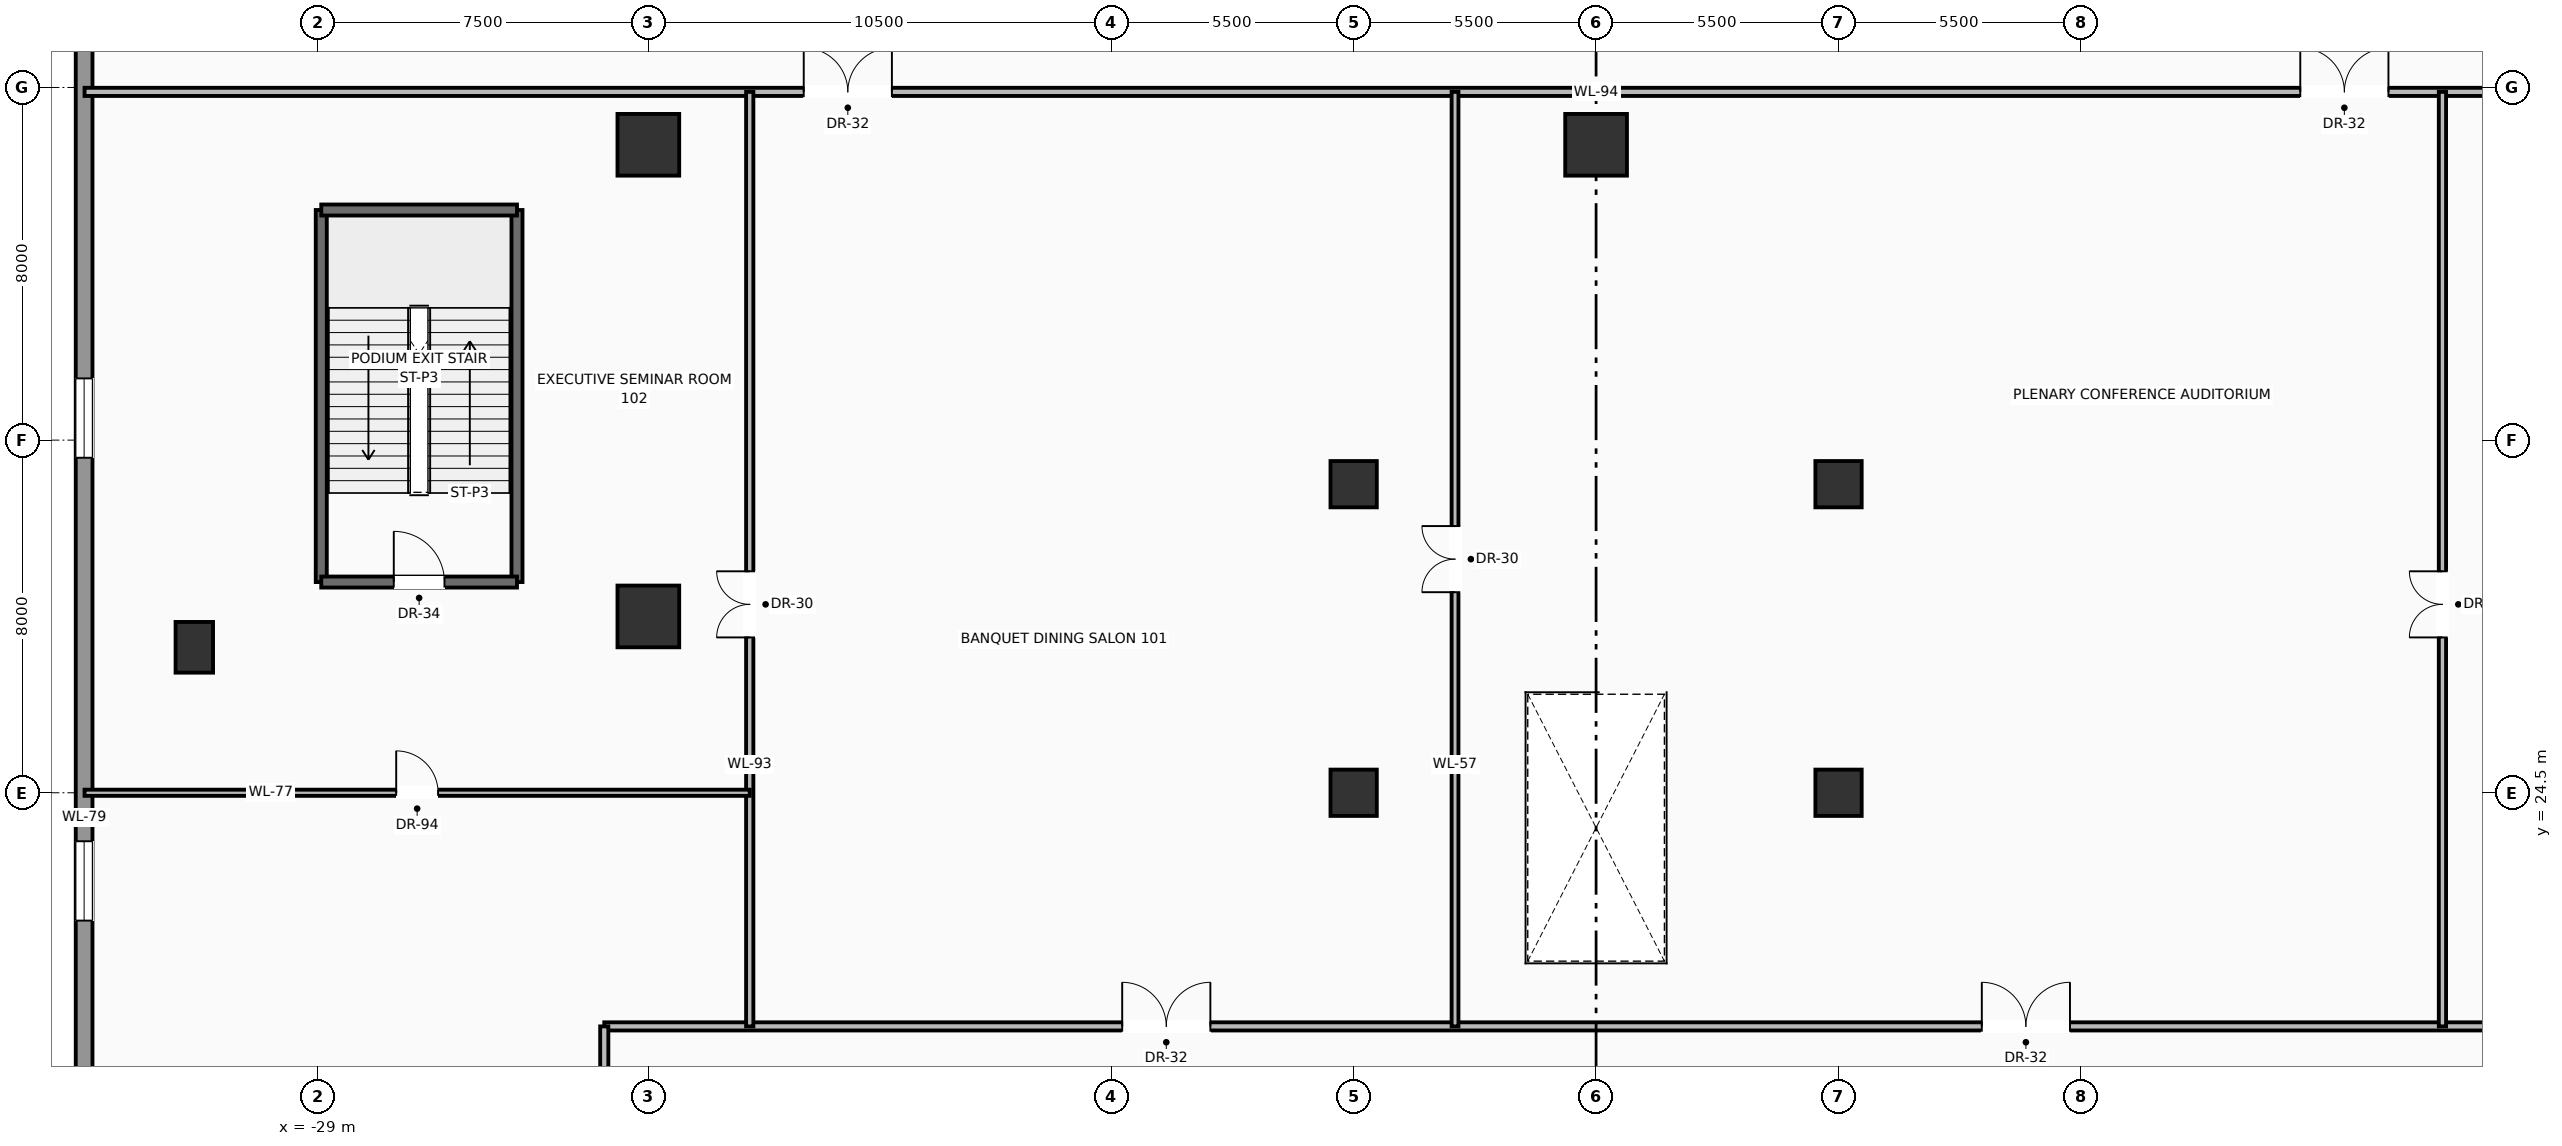
"""IFC4 building model, lengths in metres.
Left out: names, types, materials, properties, quantities, classifications, styles, units other than length and angle.
Written with IfcOpenShell. Run it as: python <this file> out.ifc"""

import sys

from ifc_helpers import new_model, si_unit, direction, frame, frame_2d, origin, origin_2d, place, context, subcontext, project, spatial, rectangle, hollow_rectangle, extrude, source, transform, mapped, element, fill, save


model = new_model("IFC4")
c1 = context("Model", 3, precision=1e-05, world=origin(), true_north=direction((0.0, 1.0)))
c2 = subcontext(c1, "Body", "Model", "MODEL_VIEW")
j1 = project(units=[si_unit("LENGTHUNIT", "METRE"), si_unit("PLANEANGLEUNIT", "RADIAN")], contexts=[c1])
p1 = place(None, origin())
s1 = spatial("IfcSite", under=j1, at=p1, CompositionType="ELEMENT")
p2 = place(p1, origin())
s2 = spatial("IfcBuilding", under=s1, at=p2, CompositionType="ELEMENT")
p3 = place(p2, frame((0.0, 0.0, 5.5)))
s3 = spatial("IfcBuildingStorey", under=s2, at=p3, CompositionType="ELEMENT", Elevation=5.5)
m1 = source(origin(), c2, "Body", "SweptSolid", [
    extrude(rectangle(XDim=1.05, YDim=1.05, at=origin_2d()), origin(), (0.0, 0.0, 1.0), 5.5),
])
for number, where, z_axis, x_axis in (
    (1, (-5.5, 24.5, 0.0), (0.0, 0.0, 1.0), (1.0, 0.0, 0.0)),
    (2, (5.5, 24.5, 0.0), (0.0, 0.0, 1.0), (1.0, 0.0, 0.0)),
    (3, (-5.5, 31.5, 0.0), (0.0, 0.0, 1.0), (1.0, 0.0, 0.0)),
    (4, (5.5, 31.5, 0.0), (0.0, 0.0, 1.0), (1.0, 0.0, 0.0)),
):
    element("IfcColumn", number, at=place(p3, frame(where, z_axis=z_axis, x_axis=x_axis)), inside=s3, PredefinedType="COLUMN", context=c2, shape_type="MappedRepresentation", body=[
        mapped(m1, transform((0.0, 0.0, 0.0), scale=1.0)),
    ])
m2 = source(origin(), c2, "Body", "SweptSolid", [
    extrude(hollow_rectangle(XDim=1.4, YDim=1.4, WallThickness=0.07, at=origin_2d()), origin(), (0.0, 0.0, 1.0), 5.5),
])
for number, where, z_axis, x_axis in (
    (5, (-21.5, 28.5, 0.0), (0.0, 0.0, 1.0), (1.0, 0.0, 0.0)),
    (6, (-21.5, 39.2, 0.0), (0.0, 0.0, 1.0), (1.0, 0.0, 0.0)),
    (7, (0.0, 39.2, 0.0), (0.0, 0.0, 1.0), (1.0, 0.0, 0.0)),
):
    element("IfcColumn", number, at=place(p3, frame(where, z_axis=z_axis, x_axis=x_axis)), inside=s3, PredefinedType="COLUMN", context=c2, shape_type="MappedRepresentation", body=[
        mapped(m2, transform((0.0, 0.0, 0.0), scale=1.0)),
    ])
m3 = source(origin(), c2, "Body", "SweptSolid", [
    extrude(rectangle(XDim=0.85, YDim=1.15, at=origin_2d()), origin(), (0.0, 0.0, 1.0), 5.5),
])
p4 = place(p3, frame((-31.8, 27.8, 0.0), z_axis=(0.0, 0.0, 1.0), x_axis=(1.0, 0.0, 0.0)))
e8 = element("IfcColumn", 8, at=p4, inside=s3, PredefinedType="COLUMN", context=c2, shape_type="MappedRepresentation", body=[
    mapped(m3, transform((0.0, 0.0, 0.0), scale=1.0)),
])
p5 = place(p3, frame((-34.3, 4.35, 0.0), z_axis=(0.0, 0.0, 1.0), x_axis=(0.0, 1.0, 0.0)))
e9 = element("IfcWall", 9, at=p5, inside=s3, PredefinedType="SOLIDWALL", context=c2, shape_type="SweptSolid", body=[
    extrude(rectangle(XDim=39.2, YDim=0.38, at=frame_2d((19.6, 0.0))), origin(), (0.0, 0.0, 1.0), 4.11),
])
p6 = place(p5, frame((6.75, 0.0, 0.95)))
e10 = element("IfcOpeningElement", 10, at=p6, cuts=e9, PredefinedType="OPENING", context=c2, shape_type="SweptSolid", body=[
    extrude(rectangle(XDim=1.8, YDim=2.4, at=frame_2d((0.9, 1.2))), frame((0.0, 0.2, 0.0), z_axis=(0.0, -1.0, 0.0), x_axis=(1.0, 0.0, 0.0)), (0.0, 0.0, 1.0), 0.4),
])
p7 = place(p5, frame((17.25, 0.0, 0.95)))
e11 = element("IfcOpeningElement", 11, at=p7, cuts=e9, PredefinedType="OPENING", context=c2, shape_type="SweptSolid", body=[
    extrude(rectangle(XDim=1.8, YDim=2.4, at=frame_2d((0.9, 1.2))), frame((0.0, 0.2, 0.0), z_axis=(0.0, -1.0, 0.0), x_axis=(1.0, 0.0, 0.0)), (0.0, 0.0, 1.0), 0.4),
])
p8 = place(p5, frame((27.75, 0.0, 0.95)))
e12 = element("IfcOpeningElement", 12, at=p8, cuts=e9, PredefinedType="OPENING", context=c2, shape_type="SweptSolid", body=[
    extrude(rectangle(XDim=1.8, YDim=2.4, at=frame_2d((0.9, 1.2))), frame((0.0, 0.2, 0.0), z_axis=(0.0, -1.0, 0.0), x_axis=(1.0, 0.0, 0.0)), (0.0, 0.0, 1.0), 0.4),
])
for number, where, z_axis, x_axis in (
    (13, (-28.92, 29.28, 0.0), (0.0, 0.0, 1.0), (0.0, 1.0, 0.0)),
    (14, (-24.48, 29.28, 0.0), (0.0, 0.0, 1.0), (0.0, 1.0, 0.0)),
):
    element("IfcWall", number, at=place(p3, frame(where, z_axis=z_axis, x_axis=x_axis)), inside=s3, PredefinedType="SOLIDWALL", context=c2, shape_type="SweptSolid", body=[
        extrude(rectangle(XDim=8.44, YDim=0.25, at=frame_2d((4.22, 0.0))), origin(), (0.0, 0.0, 1.0), 5.17),
    ])
p9 = place(p3, frame((-28.92, 29.28, 0.0), z_axis=(0.0, 0.0, 1.0), x_axis=(1.0, 0.0, 0.0)))
e15 = element("IfcWall", 15, at=p9, inside=s3, PredefinedType="SOLIDWALL", context=c2, shape_type="SweptSolid", body=[
    extrude(rectangle(XDim=4.44, YDim=0.25, at=frame_2d((2.22, 0.0))), origin(), (0.0, 0.0, 1.0), 5.17),
])
p10 = place(p9, frame((1.645, 0.0, 0.0)))
e16 = element("IfcOpeningElement", 16, at=p10, cuts=e15, PredefinedType="OPENING", context=c2, shape_type="SweptSolid", body=[
    extrude(rectangle(XDim=1.15, YDim=2.2, at=frame_2d((0.575, 1.1))), frame((0.0, 0.135, 0.0), z_axis=(0.0, -1.0, 0.0), x_axis=(1.0, 0.0, 0.0)), (0.0, 0.0, 1.0), 0.27),
])
p11 = place(p3, frame((-24.48, 37.72, 0.0), z_axis=(0.0, 0.0, 1.0), x_axis=(-1.0, 0.0, 0.0)))
e17 = element("IfcWall", 17, at=p11, inside=s3, PredefinedType="SOLIDWALL", context=c2, shape_type="SweptSolid", body=[
    extrude(rectangle(XDim=4.44, YDim=0.25, at=frame_2d((2.22, 0.0))), origin(), (0.0, 0.0, 1.0), 5.17),
])
p12 = place(p3, frame((-34.29, 40.4, 0.0), z_axis=(0.0, 0.0, 1.0), x_axis=(1.0, 0.0, 0.0)))
e18 = element("IfcWall", 18, at=p12, inside=s3, PredefinedType="PARTITIONING", context=c2, shape_type="SweptSolid", body=[
    extrude(rectangle(XDim=68.58, YDim=0.185, at=frame_2d((34.29, 0.0))), origin(), (0.0, 0.0, 1.0), 4.122),
])
p13 = place(p12, frame((16.315, 0.0, 0.0)))
e19 = element("IfcOpeningElement", 19, at=p13, cuts=e18, PredefinedType="OPENING", context=c2, shape_type="SweptSolid", body=[
    extrude(rectangle(XDim=2.0, YDim=2.4, at=frame_2d((1.0, 1.2))), frame((0.0, 0.103, 0.0), z_axis=(0.0, -1.0, 0.0), x_axis=(1.0, 0.0, 0.0)), (0.0, 0.0, 1.0), 0.205),
])
p14 = place(p12, frame((50.265, 0.0, 0.0)))
e20 = element("IfcOpeningElement", 20, at=p14, cuts=e18, PredefinedType="OPENING", context=c2, shape_type="SweptSolid", body=[
    extrude(rectangle(XDim=2.0, YDim=2.4, at=frame_2d((1.0, 1.2))), frame((0.0, 0.103, 0.0), z_axis=(0.0, -1.0, 0.0), x_axis=(1.0, 0.0, 0.0)), (0.0, 0.0, 1.0), 0.205),
])
p15 = place(p3, frame((-22.5, 19.2, 0.0), z_axis=(0.0, 0.0, 1.0), x_axis=(1.0, 0.0, 0.0)))
e21 = element("IfcWall", 21, at=p15, inside=s3, PredefinedType="PARTITIONING", context=c2, shape_type="SweptSolid", body=[
    extrude(rectangle(XDim=45.0, YDim=0.185, at=frame_2d((22.5, 0.0))), origin(), (0.0, 0.0, 1.0), 4.122),
])
p16 = place(p15, frame((11.75, 0.0, 0.0)))
e22 = element("IfcOpeningElement", 22, at=p16, cuts=e21, PredefinedType="OPENING", context=c2, shape_type="SweptSolid", body=[
    extrude(rectangle(XDim=2.0, YDim=2.4, at=frame_2d((1.0, 1.2))), frame((0.0, 0.103, 0.0), z_axis=(0.0, -1.0, 0.0), x_axis=(1.0, 0.0, 0.0)), (0.0, 0.0, 1.0), 0.205),
])
p17 = place(p15, frame((31.25, 0.0, 0.0)))
e23 = element("IfcOpeningElement", 23, at=p17, cuts=e21, PredefinedType="OPENING", context=c2, shape_type="SweptSolid", body=[
    extrude(rectangle(XDim=2.0, YDim=2.4, at=frame_2d((1.0, 1.2))), frame((0.0, 0.103, 0.0), z_axis=(0.0, -1.0, 0.0), x_axis=(1.0, 0.0, 0.0)), (0.0, 0.0, 1.0), 0.205),
])
p18 = place(p3, frame((-22.5, 16.55, 0.0), z_axis=(0.0, 0.0, 1.0), x_axis=(0.0, 1.0, 0.0)))
e24 = element("IfcWall", 24, at=p18, inside=s3, PredefinedType="PARTITIONING", context=c2, shape_type="SweptSolid", body=[
    extrude(rectangle(XDim=2.65, YDim=0.185, at=frame_2d((1.325, 0.0))), origin(), (0.0, 0.0, 1.0), 5.162),
])
p19 = place(p3, frame((-19.2, 19.2, 0.0), z_axis=(0.0, 0.0, 1.0), x_axis=(0.0, 1.0, 0.0)))
e25 = element("IfcWall", 25, at=p19, inside=s3, PredefinedType="PARTITIONING", context=c2, shape_type="SweptSolid", body=[
    extrude(rectangle(XDim=21.2, YDim=0.165, at=frame_2d((10.6, 0.0))), origin(), (0.0, 0.0, 1.0), 4.122),
])
p20 = place(p19, frame((8.824, 0.0, 0.0)))
e26 = element("IfcOpeningElement", 26, at=p20, cuts=e25, PredefinedType="OPENING", context=c2, shape_type="SweptSolid", body=[
    extrude(rectangle(XDim=1.5, YDim=2.25, at=frame_2d((0.75, 1.125))), frame((0.0, 0.093, 0.0), z_axis=(0.0, -1.0, 0.0), x_axis=(1.0, 0.0, 0.0)), (0.0, 0.0, 1.0), 0.185),
])
p21 = place(p3, frame((19.2, 19.2, 0.0), z_axis=(0.0, 0.0, 1.0), x_axis=(0.0, 1.0, 0.0)))
e27 = element("IfcWall", 27, at=p21, inside=s3, PredefinedType="PARTITIONING", context=c2, shape_type="SweptSolid", body=[
    extrude(rectangle(XDim=21.2, YDim=0.165, at=frame_2d((10.6, 0.0))), origin(), (0.0, 0.0, 1.0), 4.122),
])
p22 = place(p21, frame((8.824, 0.0, 0.0)))
e28 = element("IfcOpeningElement", 28, at=p22, cuts=e27, PredefinedType="OPENING", context=c2, shape_type="SweptSolid", body=[
    extrude(rectangle(XDim=1.5, YDim=2.25, at=frame_2d((0.75, 1.125))), frame((0.0, 0.093, 0.0), z_axis=(0.0, -1.0, 0.0), x_axis=(1.0, 0.0, 0.0)), (0.0, 0.0, 1.0), 0.185),
])
p23 = place(p3, frame((-3.2, 19.2, 0.0), z_axis=(0.0, 0.0, 1.0), x_axis=(0.0, 1.0, 0.0)))
e29 = element("IfcWall", 29, at=p23, inside=s3, PredefinedType="MOVABLE", context=c2, shape_type="SweptSolid", body=[
    extrude(rectangle(XDim=21.2, YDim=0.155, at=frame_2d((10.6, 0.0))), origin(), (0.0, 0.0, 1.0), 4.122),
])
p24 = place(p23, frame((9.85, 0.0, 0.0)))
e30 = element("IfcOpeningElement", 30, at=p24, cuts=e29, PredefinedType="OPENING", context=c2, shape_type="SweptSolid", body=[
    extrude(rectangle(XDim=1.5, YDim=2.25, at=frame_2d((0.75, 1.125))), frame((0.0, 0.087, 0.0), z_axis=(0.0, -1.0, 0.0), x_axis=(1.0, 0.0, 0.0)), (0.0, 0.0, 1.0), 0.175),
])
p25 = place(p3, frame((-34.29, 24.5, 0.0), z_axis=(0.0, 0.0, 1.0), x_axis=(1.0, 0.0, 0.0)))
e31 = element("IfcWall", 31, at=p25, inside=s3, PredefinedType="PARTITIONING", context=c2, shape_type="SweptSolid", body=[
    extrude(rectangle(XDim=15.09, YDim=0.14, at=frame_2d((7.545, 0.0))), origin(), (0.0, 0.0, 1.0), 4.235),
])
p26 = place(p25, frame((7.07, 0.0, 0.0)))
e32 = element("IfcOpeningElement", 32, at=p26, cuts=e31, PredefinedType="OPENING", context=c2, shape_type="SweptSolid", body=[
    extrude(rectangle(XDim=0.95, YDim=2.2, at=frame_2d((0.475, 1.1))), frame((0.0, 0.08, 0.0), z_axis=(0.0, -1.0, 0.0), x_axis=(1.0, 0.0, 0.0)), (0.0, 0.0, 1.0), 0.16),
])
m4 = source(origin(), c2, "Body", "SweptSolid", [
    extrude(rectangle(XDim=1.8, YDim=2.4, at=frame_2d((0.9, 1.2))), frame((0.0, 0.03, 0.0), z_axis=(0.0, -1.0, 0.0), x_axis=(1.0, 0.0, 0.0)), (0.0, 0.0, 1.0), 0.06),
])
p27 = place(p7, origin())
e33 = element("IfcWindow", 33, at=p27, inside=s3, PartitioningType="SINGLE_PANEL", PredefinedType="WINDOW", context=c2, shape_type="MappedRepresentation", body=[
    mapped(m4, transform((0.0, 0.0, 0.0), scale=1.0)),
])
fill(e11, e33)
p28 = place(p8, origin())
e34 = element("IfcWindow", 34, at=p28, inside=s3, PartitioningType="SINGLE_PANEL", PredefinedType="WINDOW", context=c2, shape_type="MappedRepresentation", body=[
    mapped(m4, transform((0.0, 0.0, 0.0), scale=1.0)),
])
fill(e12, e34)
m5 = source(origin(), c2, "Body", "SweptSolid", [
    extrude(rectangle(XDim=1.15, YDim=2.2, at=frame_2d((0.575, 1.1))), frame((0.0, 0.025, 0.0), z_axis=(0.0, -1.0, 0.0), x_axis=(1.0, 0.0, 0.0)), (0.0, 0.0, 1.0), 0.05),
])
p29 = place(p10, origin())
e35 = element("IfcDoor", 35, at=p29, inside=s3, OperationType="SINGLE_SWING_LEFT", PredefinedType="DOOR", context=c2, shape_type="MappedRepresentation", body=[
    mapped(m5, transform((0.0, 0.0, 0.0), scale=1.0)),
])
fill(e16, e35)
m6 = source(origin(), c2, "Body", "SweptSolid", [
    extrude(rectangle(XDim=2.0, YDim=2.4, at=frame_2d((1.0, 1.2))), frame((0.0, 0.025, 0.0), z_axis=(0.0, -1.0, 0.0), x_axis=(1.0, 0.0, 0.0)), (0.0, 0.0, 1.0), 0.05),
])
p30 = place(p13, origin())
e36 = element("IfcDoor", 36, at=p30, inside=s3, OperationType="DOUBLE_DOOR_SINGLE_SWING", PredefinedType="DOOR", context=c2, shape_type="MappedRepresentation", body=[
    mapped(m6, transform((0.0, 0.0, 0.0), scale=1.0)),
])
fill(e19, e36)
p31 = place(p14, origin())
e37 = element("IfcDoor", 37, at=p31, inside=s3, OperationType="DOUBLE_DOOR_SINGLE_SWING", PredefinedType="DOOR", context=c2, shape_type="MappedRepresentation", body=[
    mapped(m6, transform((0.0, 0.0, 0.0), scale=1.0)),
])
fill(e20, e37)
p32 = place(p16, origin())
e38 = element("IfcDoor", 38, at=p32, inside=s3, OperationType="DOUBLE_DOOR_SINGLE_SWING", PredefinedType="DOOR", context=c2, shape_type="MappedRepresentation", body=[
    mapped(m6, transform((0.0, 0.0, 0.0), scale=1.0)),
])
fill(e22, e38)
p33 = place(p17, origin())
e39 = element("IfcDoor", 39, at=p33, inside=s3, OperationType="DOUBLE_DOOR_SINGLE_SWING", PredefinedType="DOOR", context=c2, shape_type="MappedRepresentation", body=[
    mapped(m6, transform((0.0, 0.0, 0.0), scale=1.0)),
])
fill(e23, e39)
m7 = source(origin(), c2, "Body", "SweptSolid", [
    extrude(rectangle(XDim=1.5, YDim=2.25, at=frame_2d((0.75, 1.125))), frame((0.0, 0.025, 0.0), z_axis=(0.0, -1.0, 0.0), x_axis=(1.0, 0.0, 0.0)), (0.0, 0.0, 1.0), 0.05),
])
p34 = place(p20, origin())
e40 = element("IfcDoor", 40, at=p34, inside=s3, OperationType="DOUBLE_DOOR_SINGLE_SWING", PredefinedType="DOOR", context=c2, shape_type="MappedRepresentation", body=[
    mapped(m7, transform((0.0, 0.0, 0.0), scale=1.0)),
])
fill(e26, e40)
p35 = place(p22, origin())
e41 = element("IfcDoor", 41, at=p35, inside=s3, OperationType="DOUBLE_DOOR_SINGLE_SWING", PredefinedType="DOOR", context=c2, shape_type="MappedRepresentation", body=[
    mapped(m7, transform((0.0, 0.0, 0.0), scale=1.0)),
])
fill(e28, e41)
p36 = place(p24, origin())
e42 = element("IfcDoor", 42, at=p36, inside=s3, OperationType="DOUBLE_DOOR_SINGLE_SWING", PredefinedType="DOOR", context=c2, shape_type="MappedRepresentation", body=[
    mapped(m7, transform((0.0, 0.0, 0.0), scale=1.0)),
])
fill(e30, e42)
m8 = source(origin(), c2, "Body", "SweptSolid", [
    extrude(rectangle(XDim=0.95, YDim=2.2, at=frame_2d((0.475, 1.1))), frame((0.0, 0.025, 0.0), z_axis=(0.0, -1.0, 0.0), x_axis=(1.0, 0.0, 0.0)), (0.0, 0.0, 1.0), 0.05),
])
p37 = place(p26, origin())
e43 = element("IfcDoor", 43, at=p37, inside=s3, OperationType="SINGLE_SWING_LEFT", PredefinedType="DOOR", context=c2, shape_type="MappedRepresentation", body=[
    mapped(m8, transform((0.0, 0.0, 0.0), scale=1.0)),
])
fill(e32, e43)
save(model, sys.argv[1])
